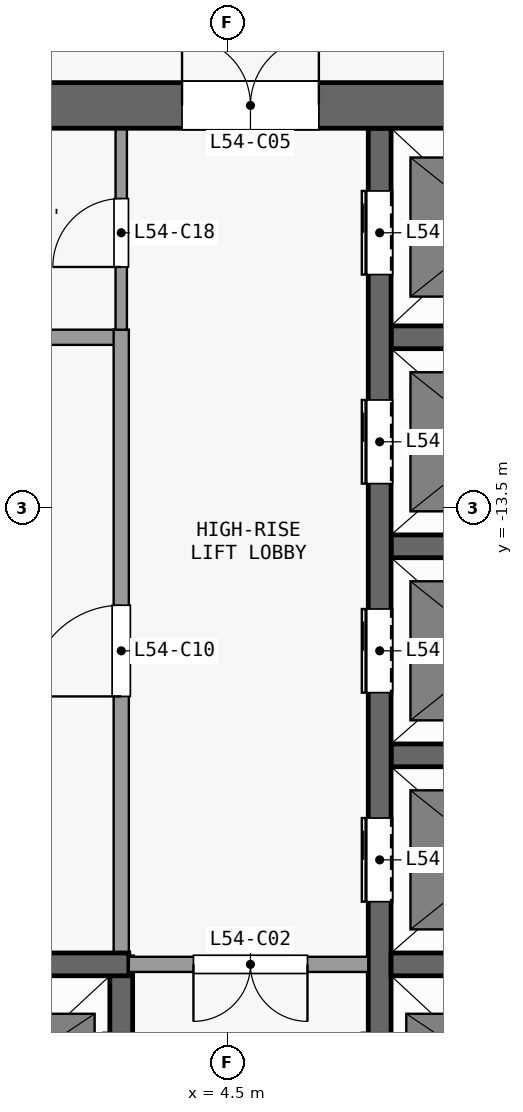
"""IFC4 building model, lengths in metres.
Left out: names, types, materials, properties, quantities, classifications, styles, units other than length and angle.
Written with IfcOpenShell. Run it as: python <this file> out.ifc"""

import sys

from ifc_helpers import new_model, si_unit, direction, frame, frame_2d, origin, place, context, subcontext, project, spatial, rectangle, extrude, element, fill, save


model = new_model("IFC4")
c1 = context("Model", 3, precision=1e-05, world=origin(), true_north=direction((0.0, 1.0)))
c2 = subcontext(c1, "Body", "Model", "MODEL_VIEW")
j1 = project(units=[si_unit("LENGTHUNIT", "METRE"), si_unit("PLANEANGLEUNIT", "RADIAN")], contexts=[c1])
p1 = place(None, origin())
s1 = spatial("IfcSite", under=j1, at=p1, CompositionType="ELEMENT")
p2 = place(p1, origin())
s2 = spatial("IfcBuilding", under=s1, at=p2, CompositionType="ELEMENT")
p3 = place(p2, frame((0.0, 0.0, 215.9)))
s3 = spatial("IfcBuildingStorey", under=s2, at=p3, CompositionType="ELEMENT", Elevation=215.9)
p4 = place(p3, frame((-13.2, -8.2, 0.0), z_axis=(0.0, 0.0, 1.0), x_axis=(1.0, 0.0, 0.0)))
e1 = element("IfcWall", 1, at=p4, inside=s3, PredefinedType="SHEAR", context=c2, shape_type="SweptSolid", body=[
    extrude(rectangle(XDim=26.4, YDim=0.6, at=frame_2d((13.2, 0.0))), origin(), (0.0, 0.0, 1.0), 3.3),
])
p5 = place(p4, frame((7.5, 0.0, 0.0)))
e2 = element("IfcOpeningElement", 2, at=p5, cuts=e1, PredefinedType="OPENING", context=c2, shape_type="SweptSolid", body=[
    extrude(rectangle(XDim=1.8, YDim=2.1, at=frame_2d((0.9, 1.05))), frame((0.0, 0.31, 0.0), z_axis=(0.0, -1.0, 0.0), x_axis=(1.0, 0.0, 0.0)), (0.0, 0.0, 1.0), 0.62),
])
p6 = place(p4, frame((17.1, 0.0, 0.0)))
e3 = element("IfcOpeningElement", 3, at=p6, cuts=e1, PredefinedType="OPENING", context=c2, shape_type="SweptSolid", body=[
    extrude(rectangle(XDim=1.8, YDim=2.1, at=frame_2d((0.9, 1.05))), frame((0.0, 0.31, 0.0), z_axis=(0.0, -1.0, 0.0), x_axis=(1.0, 0.0, 0.0)), (0.0, 0.0, 1.0), 0.62),
])
p7 = place(p4, frame((2.425, 0.0, 0.0)))
e4 = element("IfcOpeningElement", 4, at=p7, cuts=e1, PredefinedType="OPENING", context=c2, shape_type="SweptSolid", body=[
    extrude(rectangle(XDim=0.9, YDim=2.1, at=frame_2d((0.45, 1.05))), frame((0.0, 0.31, 0.0), z_axis=(0.0, -1.0, 0.0), x_axis=(1.0, 0.0, 0.0)), (0.0, 0.0, 1.0), 0.62),
])
p8 = place(p4, frame((23.075, 0.0, 0.0)))
e5 = element("IfcOpeningElement", 5, at=p8, cuts=e1, PredefinedType="OPENING", context=c2, shape_type="SweptSolid", body=[
    extrude(rectangle(XDim=0.9, YDim=2.1, at=frame_2d((0.45, 1.05))), frame((0.0, 0.31, 0.0), z_axis=(0.0, -1.0, 0.0), x_axis=(1.0, 0.0, 0.0)), (0.0, 0.0, 1.0), 0.62),
])
p9 = place(p3, frame((-0.1, -19.5, 0.0), z_axis=(0.0, 0.0, 1.0), x_axis=(1.0, 0.0, 0.0)))
e6 = element("IfcWall", 6, at=p9, inside=s3, PredefinedType="SHEAR", context=c2, shape_type="SweptSolid", body=[
    extrude(rectangle(XDim=3.3, YDim=0.3, at=frame_2d((1.65, 0.0))), origin(), (0.0, 0.0, 1.0), 3.3),
])
p10 = place(p3, frame((6.35, -19.5, 0.0), z_axis=(0.0, 0.0, 1.0), x_axis=(-1.0, 0.0, 0.0)))
e7 = element("IfcWall", 7, at=p10, inside=s3, PredefinedType="PARTITIONING", context=c2, shape_type="SweptSolid", body=[
    extrude(rectangle(XDim=3.15, YDim=0.2, at=frame_2d((1.575, 0.0))), origin(), (0.0, 0.0, 1.0), 3.3),
])
p11 = place(p10, frame((0.8, 0.0, 0.0)))
e8 = element("IfcOpeningElement", 8, at=p11, cuts=e7, PredefinedType="OPENING", context=c2, shape_type="SweptSolid", body=[
    extrude(rectangle(XDim=1.5, YDim=2.1, at=frame_2d((0.75, 1.05))), frame((0.0, 0.11, 0.0), z_axis=(0.0, -1.0, 0.0), x_axis=(1.0, 0.0, 0.0)), (0.0, 0.0, 1.0), 0.22),
])
for number, where, z_axis, x_axis in (
    (9, (6.65, -19.5, 0.0), (0.0, 0.0, 1.0), (1.0, 0.0, 0.0)),
    (10, (6.65, -16.75, 0.0), (0.0, 0.0, 1.0), (1.0, 0.0, 0.0)),
    (11, (6.65, -14.0, 0.0), (0.0, 0.0, 1.0), (1.0, 0.0, 0.0)),
):
    element("IfcWall", number, at=place(p3, frame(where, z_axis=z_axis, x_axis=x_axis)), inside=s3, PredefinedType="SHEAR", context=c2, shape_type="SweptSolid", body=[
        extrude(rectangle(XDim=2.8, YDim=0.3, at=frame_2d((1.4, 0.0))), origin(), (0.0, 0.0, 1.0), 3.3),
    ])
p12 = place(p3, frame((-0.075, -11.25, 0.0), z_axis=(0.0, 0.0, 1.0), x_axis=(1.0, 0.0, 0.0)))
e12 = element("IfcWall", 12, at=p12, inside=s3, PredefinedType="PARTITIONING", context=c2, shape_type="SweptSolid", body=[
    extrude(rectangle(XDim=3.25, YDim=0.2, at=frame_2d((1.625, 0.0))), origin(), (0.0, 0.0, 1.0), 3.3),
])
p13 = place(p3, frame((6.65, -11.25, 0.0), z_axis=(0.0, 0.0, 1.0), x_axis=(1.0, 0.0, 0.0)))
e13 = element("IfcWall", 13, at=p13, inside=s3, PredefinedType="SHEAR", context=c2, shape_type="SweptSolid", body=[
    extrude(rectangle(XDim=2.8, YDim=0.3, at=frame_2d((1.4, 0.0))), origin(), (0.0, 0.0, 1.0), 3.3),
])
p14 = place(p3, frame((3.1, -22.25, 0.0), z_axis=(0.0, 0.0, 1.0), x_axis=(0.0, 1.0, 0.0)))
e14 = element("IfcWall", 14, at=p14, inside=s3, PredefinedType="SHEAR", context=c2, shape_type="SweptSolid", body=[
    extrude(rectangle(XDim=2.85, YDim=0.3, at=frame_2d((1.425, 0.0))), origin(), (0.0, 0.0, 1.0), 3.3),
])
p15 = place(p14, frame((0.75, 0.0, 0.0)))
e15 = element("IfcOpeningElement", 15, at=p15, cuts=e14, PredefinedType="OPENING", context=c2, shape_type="SweptSolid", body=[
    extrude(rectangle(XDim=1.1, YDim=2.1, at=frame_2d((0.55, 1.05))), frame((0.0, 0.16, 0.0), z_axis=(0.0, -1.0, 0.0), x_axis=(1.0, 0.0, 0.0)), (0.0, 0.0, 1.0), 0.32),
])
p16 = place(p3, frame((3.1, -19.6, 0.0), z_axis=(0.0, 0.0, 1.0), x_axis=(0.0, 1.0, 0.0)))
e16 = element("IfcWall", 16, at=p16, inside=s3, PredefinedType="PARTITIONING", context=c2, shape_type="SweptSolid", body=[
    extrude(rectangle(XDim=8.45, YDim=0.2, at=frame_2d((4.225, 0.0))), origin(), (0.0, 0.0, 1.0), 3.3),
])
p17 = place(p16, frame((3.625, 0.0, 0.0)))
e17 = element("IfcOpeningElement", 17, at=p17, cuts=e16, PredefinedType="OPENING", context=c2, shape_type="SweptSolid", body=[
    extrude(rectangle(XDim=1.2, YDim=2.1, at=frame_2d((0.6, 1.05))), frame((0.0, 0.11, 0.0), z_axis=(0.0, -1.0, 0.0), x_axis=(1.0, 0.0, 0.0)), (0.0, 0.0, 1.0), 0.22),
])
p18 = place(p3, frame((3.1, -11.15, 0.0), z_axis=(0.0, 0.0, 1.0), x_axis=(0.0, 1.0, 0.0)))
e18 = element("IfcWall", 18, at=p18, inside=s3, PredefinedType="PARTITIONING", context=c2, shape_type="SweptSolid", body=[
    extrude(rectangle(XDim=2.65, YDim=0.15, at=frame_2d((1.325, 0.0))), origin(), (0.0, 0.0, 1.0), 3.3),
])
p19 = place(p18, frame((0.825, 0.0, 0.0)))
e19 = element("IfcOpeningElement", 19, at=p19, cuts=e18, PredefinedType="OPENING", context=c2, shape_type="SweptSolid", body=[
    extrude(rectangle(XDim=0.9, YDim=2.1, at=frame_2d((0.45, 1.05))), frame((0.0, 0.085, 0.0), z_axis=(0.0, -1.0, 0.0), x_axis=(1.0, 0.0, 0.0)), (0.0, 0.0, 1.0), 0.17),
])
p20 = place(p3, frame((6.5, -22.55, 0.0), z_axis=(0.0, 0.0, 1.0), x_axis=(0.0, 1.0, 0.0)))
e20 = element("IfcWall", 20, at=p20, inside=s3, PredefinedType="SHEAR", context=c2, shape_type="SweptSolid", body=[
    extrude(rectangle(XDim=14.05, YDim=0.3, at=frame_2d((7.025, 0.0))), origin(), (0.0, 0.0, 1.0), 3.3),
])
p21 = place(p20, frame((1.05, 0.0, 0.0)))
e21 = element("IfcOpeningElement", 21, at=p21, cuts=e20, PredefinedType="OPENING", context=c2, shape_type="SweptSolid", body=[
    extrude(rectangle(XDim=1.1, YDim=2.1, at=frame_2d((0.55, 1.05))), frame((0.0, 0.16, 0.0), z_axis=(0.0, -1.0, 0.0), x_axis=(1.0, 0.0, 0.0)), (0.0, 0.0, 1.0), 0.32),
])
p22 = place(p20, frame((3.875, 0.0, 0.0)))
e22 = element("IfcOpeningElement", 22, at=p22, cuts=e20, PredefinedType="OPENING", context=c2, shape_type="SweptSolid", body=[
    extrude(rectangle(XDim=1.1, YDim=2.1, at=frame_2d((0.55, 1.05))), frame((0.0, 0.16, 0.0), z_axis=(0.0, -1.0, 0.0), x_axis=(1.0, 0.0, 0.0)), (0.0, 0.0, 1.0), 0.32),
])
p23 = place(p20, frame((6.625, 0.0, 0.0)))
e23 = element("IfcOpeningElement", 23, at=p23, cuts=e20, PredefinedType="OPENING", context=c2, shape_type="SweptSolid", body=[
    extrude(rectangle(XDim=1.1, YDim=2.1, at=frame_2d((0.55, 1.05))), frame((0.0, 0.16, 0.0), z_axis=(0.0, -1.0, 0.0), x_axis=(1.0, 0.0, 0.0)), (0.0, 0.0, 1.0), 0.32),
])
p24 = place(p20, frame((9.375, 0.0, 0.0)))
e24 = element("IfcOpeningElement", 24, at=p24, cuts=e20, PredefinedType="OPENING", context=c2, shape_type="SweptSolid", body=[
    extrude(rectangle(XDim=1.1, YDim=2.1, at=frame_2d((0.55, 1.05))), frame((0.0, 0.16, 0.0), z_axis=(0.0, -1.0, 0.0), x_axis=(1.0, 0.0, 0.0)), (0.0, 0.0, 1.0), 0.32),
])
p25 = place(p20, frame((12.125, 0.0, 0.0)))
e25 = element("IfcOpeningElement", 25, at=p25, cuts=e20, PredefinedType="OPENING", context=c2, shape_type="SweptSolid", body=[
    extrude(rectangle(XDim=1.1, YDim=2.1, at=frame_2d((0.55, 1.05))), frame((0.0, 0.16, 0.0), z_axis=(0.0, -1.0, 0.0), x_axis=(1.0, 0.0, 0.0)), (0.0, 0.0, 1.0), 0.32),
])
p26 = place(p22, origin())
e26 = element("IfcDoor", 26, at=p26, inside=s3, OperationType="DOUBLE_DOOR_SLIDING", PredefinedType="DOOR", context=c2, shape_type="SweptSolid", body=[
    extrude(rectangle(XDim=1.1, YDim=2.1, at=frame_2d((0.55, 1.05))), frame((0.0, 0.025, 0.0), z_axis=(0.0, -1.0, 0.0), x_axis=(1.0, 0.0, 0.0)), (0.0, 0.0, 1.0), 0.05),
])
fill(e22, e26)
p27 = place(p23, origin())
e27 = element("IfcDoor", 27, at=p27, inside=s3, OperationType="DOUBLE_DOOR_SLIDING", PredefinedType="DOOR", context=c2, shape_type="SweptSolid", body=[
    extrude(rectangle(XDim=1.1, YDim=2.1, at=frame_2d((0.55, 1.05))), frame((0.0, 0.025, 0.0), z_axis=(0.0, -1.0, 0.0), x_axis=(1.0, 0.0, 0.0)), (0.0, 0.0, 1.0), 0.05),
])
fill(e23, e27)
p28 = place(p24, origin())
e28 = element("IfcDoor", 28, at=p28, inside=s3, OperationType="DOUBLE_DOOR_SLIDING", PredefinedType="DOOR", context=c2, shape_type="SweptSolid", body=[
    extrude(rectangle(XDim=1.1, YDim=2.1, at=frame_2d((0.55, 1.05))), frame((0.0, 0.025, 0.0), z_axis=(0.0, -1.0, 0.0), x_axis=(1.0, 0.0, 0.0)), (0.0, 0.0, 1.0), 0.05),
])
fill(e24, e28)
p29 = place(p25, origin())
e29 = element("IfcDoor", 29, at=p29, inside=s3, OperationType="DOUBLE_DOOR_SLIDING", PredefinedType="DOOR", context=c2, shape_type="SweptSolid", body=[
    extrude(rectangle(XDim=1.1, YDim=2.1, at=frame_2d((0.55, 1.05))), frame((0.0, 0.025, 0.0), z_axis=(0.0, -1.0, 0.0), x_axis=(1.0, 0.0, 0.0)), (0.0, 0.0, 1.0), 0.05),
])
fill(e25, e29)
p30 = place(p11, origin())
e30 = element("IfcDoor", 30, at=p30, inside=s3, OperationType="DOUBLE_DOOR_SINGLE_SWING", PredefinedType="DOOR", context=c2, shape_type="SweptSolid", body=[
    extrude(rectangle(XDim=1.5, YDim=2.1, at=frame_2d((0.75, 1.05))), frame((0.0, 0.025, 0.0), z_axis=(0.0, -1.0, 0.0), x_axis=(1.0, 0.0, 0.0)), (0.0, 0.0, 1.0), 0.05),
])
fill(e8, e30)
p31 = place(p6, origin())
e31 = element("IfcDoor", 31, at=p31, inside=s3, OperationType="DOUBLE_DOOR_SINGLE_SWING", PredefinedType="DOOR", context=c2, shape_type="SweptSolid", body=[
    extrude(rectangle(XDim=1.8, YDim=2.1, at=frame_2d((0.9, 1.05))), frame((0.0, 0.025, 0.0), z_axis=(0.0, -1.0, 0.0), x_axis=(1.0, 0.0, 0.0)), (0.0, 0.0, 1.0), 0.05),
])
fill(e3, e31)
p32 = place(p17, origin())
e32 = element("IfcDoor", 32, at=p32, inside=s3, OperationType="SINGLE_SWING_LEFT", PredefinedType="DOOR", context=c2, shape_type="SweptSolid", body=[
    extrude(rectangle(XDim=1.2, YDim=2.1, at=frame_2d((0.6, 1.05))), frame((0.0, 0.025, 0.0), z_axis=(0.0, -1.0, 0.0), x_axis=(1.0, 0.0, 0.0)), (0.0, 0.0, 1.0), 0.05),
])
fill(e17, e32)
p33 = place(p19, origin())
e33 = element("IfcDoor", 33, at=p33, inside=s3, OperationType="SINGLE_SWING_LEFT", PredefinedType="DOOR", context=c2, shape_type="SweptSolid", body=[
    extrude(rectangle(XDim=0.9, YDim=2.1, at=frame_2d((0.45, 1.05))), frame((0.0, 0.025, 0.0), z_axis=(0.0, -1.0, 0.0), x_axis=(1.0, 0.0, 0.0)), (0.0, 0.0, 1.0), 0.05),
])
fill(e19, e33)
save(model, sys.argv[1])
